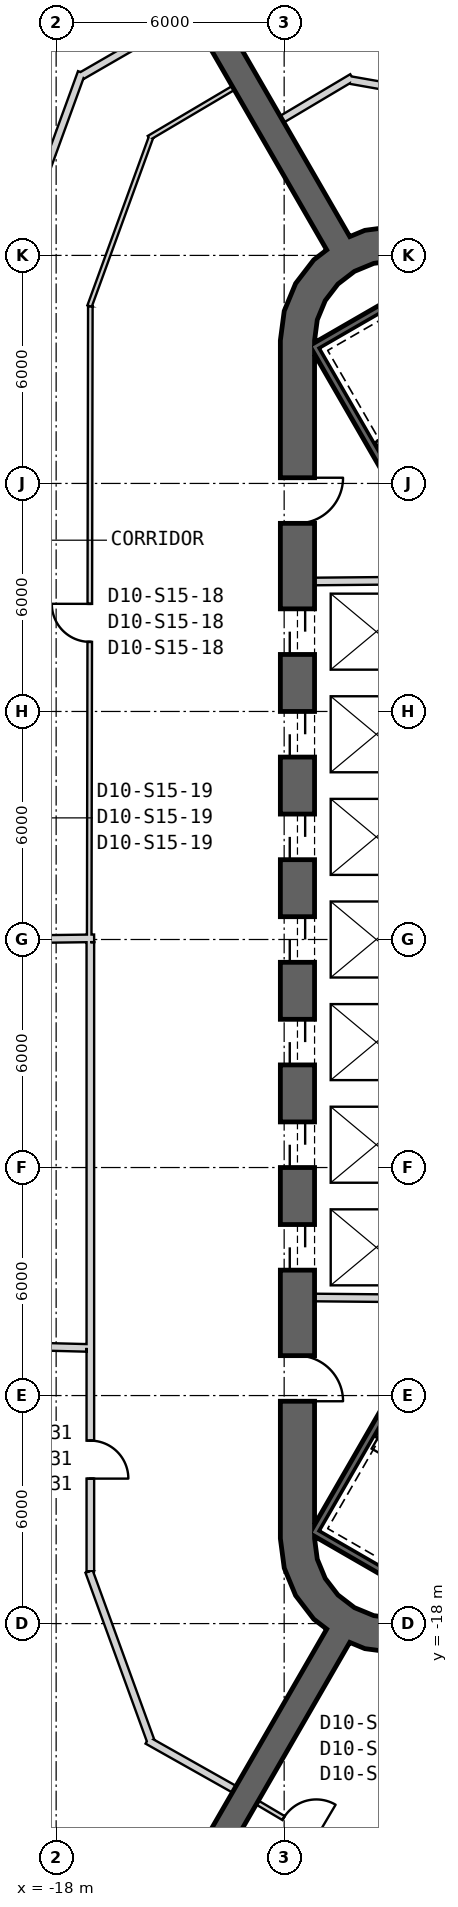
"""IFC4 building model, lengths in metres.
Left out: names, types, materials, properties, quantities, classifications, styles, units other than length and angle.
Written with IfcOpenShell. Run it as: python <this file> out.ifc"""

import sys

from ifc_helpers import new_model, si_unit, direction, frame, frame_2d, origin, place, context, subcontext, project, spatial, polyline, rectangle, outline, extrude, element, fill, save


model = new_model("IFC4")
c1 = context("Model", 3, precision=1e-05, world=origin(), true_north=direction((0.0, 1.0)))
c2 = subcontext(c1, "Body", "Model", "MODEL_VIEW")
j1 = project(units=[si_unit("LENGTHUNIT", "METRE"), si_unit("PLANEANGLEUNIT", "RADIAN")], contexts=[c1])
p1 = place(None, origin())
s1 = spatial("IfcSite", under=j1, at=p1, CompositionType="ELEMENT")
p2 = place(p1, origin())
s2 = spatial("IfcBuilding", under=s1, at=p2, CompositionType="ELEMENT")
p3 = place(p2, frame((0.0, 0.0, 241.2)))
s3 = spatial("IfcBuildingStorey", under=s2, at=p3, CompositionType="ELEMENT", Elevation=241.2)
p4 = place(p3, frame((-11.65, 15.762, 0.0), z_axis=(0.0, 0.0, 1.0), x_axis=(0.0, -1.0, 0.0)))
e1 = element("IfcWall", 1, at=p4, inside=s3, PredefinedType="SHEAR", context=c2, shape_type="SweptSolid", body=[
    extrude(rectangle(XDim=31.523, YDim=0.9, at=frame_2d((15.762, 0.0))), origin(), (0.0, 0.0, 1.0), 4.0),
])
p5 = place(p4, frame((7.062, 0.0, 0.0)))
e2 = element("IfcOpeningElement", 2, at=p5, cuts=e1, PredefinedType="OPENING", context=c2, shape_type="SweptSolid", body=[
    extrude(rectangle(XDim=1.2, YDim=2.4, at=frame_2d((0.6, 1.2))), frame((0.0, 0.46, 0.0), z_axis=(0.0, -1.0, 0.0), x_axis=(1.0, 0.0, 0.0)), (0.0, 0.0, 1.0), 0.92),
])
p6 = place(p4, frame((9.762, 0.0, 0.0)))
e3 = element("IfcOpeningElement", 3, at=p6, cuts=e1, PredefinedType="OPENING", context=c2, shape_type="SweptSolid", body=[
    extrude(rectangle(XDim=1.2, YDim=2.4, at=frame_2d((0.6, 1.2))), frame((0.0, 0.46, 0.0), z_axis=(0.0, -1.0, 0.0), x_axis=(1.0, 0.0, 0.0)), (0.0, 0.0, 1.0), 0.92),
])
p7 = place(p4, frame((12.462, 0.0, 0.0)))
e4 = element("IfcOpeningElement", 4, at=p7, cuts=e1, PredefinedType="OPENING", context=c2, shape_type="SweptSolid", body=[
    extrude(rectangle(XDim=1.2, YDim=2.4, at=frame_2d((0.6, 1.2))), frame((0.0, 0.46, 0.0), z_axis=(0.0, -1.0, 0.0), x_axis=(1.0, 0.0, 0.0)), (0.0, 0.0, 1.0), 0.92),
])
p8 = place(p4, frame((15.162, 0.0, 0.0)))
e5 = element("IfcOpeningElement", 5, at=p8, cuts=e1, PredefinedType="OPENING", context=c2, shape_type="SweptSolid", body=[
    extrude(rectangle(XDim=1.2, YDim=2.4, at=frame_2d((0.6, 1.2))), frame((0.0, 0.46, 0.0), z_axis=(0.0, -1.0, 0.0), x_axis=(1.0, 0.0, 0.0)), (0.0, 0.0, 1.0), 0.92),
])
p9 = place(p4, frame((17.862, 0.0, 0.0)))
e6 = element("IfcOpeningElement", 6, at=p9, cuts=e1, PredefinedType="OPENING", context=c2, shape_type="SweptSolid", body=[
    extrude(rectangle(XDim=1.2, YDim=2.4, at=frame_2d((0.6, 1.2))), frame((0.0, 0.46, 0.0), z_axis=(0.0, -1.0, 0.0), x_axis=(1.0, 0.0, 0.0)), (0.0, 0.0, 1.0), 0.92),
])
p10 = place(p4, frame((20.562, 0.0, 0.0)))
e7 = element("IfcOpeningElement", 7, at=p10, cuts=e1, PredefinedType="OPENING", context=c2, shape_type="SweptSolid", body=[
    extrude(rectangle(XDim=1.2, YDim=2.4, at=frame_2d((0.6, 1.2))), frame((0.0, 0.46, 0.0), z_axis=(0.0, -1.0, 0.0), x_axis=(1.0, 0.0, 0.0)), (0.0, 0.0, 1.0), 0.92),
])
p11 = place(p4, frame((23.262, 0.0, 0.0)))
e8 = element("IfcOpeningElement", 8, at=p11, cuts=e1, PredefinedType="OPENING", context=c2, shape_type="SweptSolid", body=[
    extrude(rectangle(XDim=1.2, YDim=2.4, at=frame_2d((0.6, 1.2))), frame((0.0, 0.46, 0.0), z_axis=(0.0, -1.0, 0.0), x_axis=(1.0, 0.0, 0.0)), (0.0, 0.0, 1.0), 0.92),
])
p12 = place(p4, frame((3.612, 0.0, 0.0)))
e9 = element("IfcOpeningElement", 9, at=p12, cuts=e1, PredefinedType="OPENING", context=c2, shape_type="SweptSolid", body=[
    extrude(rectangle(XDim=1.2, YDim=2.4, at=frame_2d((0.6, 1.2))), frame((0.0, 0.46, 0.0), z_axis=(0.0, -1.0, 0.0), x_axis=(1.0, 0.0, 0.0)), (0.0, 0.0, 1.0), 0.92),
])
p13 = place(p4, frame((26.712, 0.0, 0.0)))
e10 = element("IfcOpeningElement", 10, at=p13, cuts=e1, PredefinedType="OPENING", context=c2, shape_type="SweptSolid", body=[
    extrude(rectangle(XDim=1.2, YDim=2.4, at=frame_2d((0.6, 1.2))), frame((0.0, 0.46, 0.0), z_axis=(0.0, -1.0, 0.0), x_axis=(1.0, 0.0, 0.0)), (0.0, 0.0, 1.0), 0.92),
])
p14 = place(p3, origin())
e11 = element("IfcWall", 11, at=p14, inside=s3, PredefinedType="SHEAR", context=c2, shape_type="SweptSolid", body=[
    extrude(outline(polyline([(-7.6, 18.36), (-8.323, 18.659), (-9.1, 18.762), (-9.876, 18.659), (-10.6, 18.36), (-11.221, 17.883), (-11.698, 17.262), (-11.998, 16.538), (-12.1, 15.762), (-11.2, 15.762), (-11.128, 16.305), (-10.919, 16.812), (-10.585, 17.247), (-10.15, 17.58), (-9.644, 17.79), (-9.1, 17.862), (-8.556, 17.79), (-8.05, 17.58), (-7.6, 18.36)])), origin(), (0.0, 0.0, 1.0), 4.0),
])
p15 = place(p3, origin())
e12 = element("IfcWall", 12, at=p15, inside=s3, PredefinedType="SHEAR", context=c2, shape_type="SweptSolid", body=[
    extrude(outline(polyline([(-12.1, -15.762), (-11.998, -16.538), (-11.698, -17.262), (-11.221, -17.883), (-10.6, -18.36), (-9.876, -18.659), (-9.1, -18.762), (-8.323, -18.659), (-7.6, -18.36), (-8.05, -17.58), (-8.556, -17.79), (-9.1, -17.862), (-9.644, -17.79), (-10.15, -17.58), (-10.585, -17.247), (-10.919, -16.812), (-11.128, -16.305), (-11.2, -15.762), (-12.1, -15.762)])), origin(), (0.0, 0.0, 1.0), 4.0),
])
for number, where, z_axis, x_axis in (
    (13, (-10.575, 18.316, 0.0), (0.0, 0.0, 1.0), (-0.5, 0.866, 0.0)),
    (14, (-10.575, -18.316, 0.0), (0.0, 0.0, 1.0), (-0.5, -0.866, 0.0)),
):
    element("IfcWall", number, at=place(p3, frame(where, z_axis=z_axis, x_axis=x_axis)), inside=s3, PredefinedType="SHEAR", context=c2, shape_type="SweptSolid", body=[
        extrude(rectangle(XDim=10.9, YDim=0.7, at=frame_2d((5.45, 0.0))), origin(), (0.0, 0.0, 1.0), 4.0),
    ])
p16 = place(p3, frame((-11.2, 9.42, 0.0), z_axis=(0.0, 0.0, 1.0), x_axis=(0.999957167047, 0.009255488683, 0.0)))
e15 = element("IfcWall", 15, at=p16, inside=s3, PredefinedType="PLUMBINGWALL", context=c2, shape_type="SweptSolid", body=[
    extrude(rectangle(XDim=3.35, YDim=0.2, at=frame_2d((1.675, 0.0))), origin(), (0.0, 0.0, 1.0), 3.7),
])
p17 = place(p3, frame((-8.05, -9.449, 0.0), z_axis=(0.0, 0.0, 1.0), x_axis=(-0.999957467379, 0.009222983926, 0.0)))
e16 = element("IfcWall", 16, at=p17, inside=s3, PredefinedType="PLUMBINGWALL", context=c2, shape_type="SweptSolid", body=[
    extrude(rectangle(XDim=3.15, YDim=0.2, at=frame_2d((1.575, 0.0))), origin(), (0.0, 0.0, 1.0), 3.7),
])
p18 = place(p3, frame((-11.245, 15.678, -0.3), z_axis=(0.0, 0.0, 1.0), x_axis=(0.499977274689, -0.866038523851, 0.0)))
e17 = element("IfcWall", 17, at=p18, inside=s3, PredefinedType="SHEAR", context=c2, shape_type="SweptSolid", body=[
    extrude(rectangle(XDim=8.1, YDim=0.2, at=frame_2d((4.05, 0.0))), origin(), (0.0, 0.0, 1.0), 4.0),
])
for number, where, z_axis, x_axis in (
    (18, (-7.818, 17.541, -0.3), (0.0, 0.0, 1.0), (-0.866, -0.5, 0.0)),
    (19, (-11.282, -15.541, -0.3), (0.0, 0.0, 1.0), (0.866, -0.5, 0.0)),
):
    element("IfcWall", number, at=place(p3, frame(where, z_axis=z_axis, x_axis=x_axis)), inside=s3, PredefinedType="SHEAR", context=c2, shape_type="SweptSolid", body=[
        extrude(rectangle(XDim=3.8, YDim=0.2, at=frame_2d((1.9, 0.0))), origin(), (0.0, 0.0, 1.0), 4.0),
    ])
p19 = place(p3, frame((-7.196, -8.663, -0.3), z_axis=(0.0, 0.0, 1.0), x_axis=(-0.499997992926, -0.866026562566, 0.0)))
e20 = element("IfcWall", 20, at=p19, inside=s3, PredefinedType="SHEAR", context=c2, shape_type="SweptSolid", body=[
    extrude(rectangle(XDim=7.9, YDim=0.2, at=frame_2d((3.95, 0.0))), origin(), (0.0, 0.0, 1.0), 4.0),
])
p20 = place(p3, frame((-13.339, 22.405, 0.0), z_axis=(0.0, 0.0, 1.0), x_axis=(-0.86070028932, -0.509111983718, 0.0)))
e21 = element("IfcWall", 21, at=p20, inside=s3, PredefinedType="PARTITIONING", context=c2, shape_type="SweptSolid", body=[
    extrude(rectangle(XDim=2.579, YDim=0.12, at=frame_2d((1.29, 0.0))), origin(), (0.0, 0.0, 1.0), 3.7),
])
p21 = place(p3, frame((-15.506, 21.103, 0.0), z_axis=(0.0, 0.0, 1.0), x_axis=(-0.342017079535, -0.939693735909, 0.0)))
e22 = element("IfcWall", 22, at=p21, inside=s3, PredefinedType="PARTITIONING", context=c2, shape_type="SweptSolid", body=[
    extrude(rectangle(XDim=4.721, YDim=0.12, at=frame_2d((2.361, 0.0))), origin(), (0.0, 0.0, 1.0), 2.88),
])
p22 = place(p3, frame((-17.13, 0.0, 0.0), z_axis=(0.0, 0.0, 1.0), x_axis=(0.001787542932, 0.999998402344, 0.0)))
e23 = element("IfcWall", 23, at=p22, inside=s3, PredefinedType="PARTITIONING", context=c2, shape_type="SweptSolid", body=[
    extrude(rectangle(XDim=16.663, YDim=0.12, at=frame_2d((8.331, 0.0))), origin(), (0.0, 0.0, 1.0), 2.98),
])
p23 = place(p22, frame((7.831, 0.0, 0.0)))
e24 = element("IfcOpeningElement", 24, at=p23, cuts=e23, PredefinedType="OPENING", context=c2, shape_type="SweptSolid", body=[
    extrude(rectangle(XDim=1.0, YDim=2.1, at=frame_2d((0.5, 1.05))), frame((0.0, 0.07, 0.0), z_axis=(0.0, -1.0, 0.0), x_axis=(1.0, 0.0, 0.0)), (0.0, 0.0, 1.0), 0.14),
])
p24 = place(p3, frame((-19.5, -0.001, 0.0), z_axis=(0.0, 0.0, 1.0), x_axis=(0.999915662945, 0.012987185857, 0.0)))
e25 = element("IfcWall", 25, at=p24, inside=s3, PredefinedType="PARTITIONING", context=c2, shape_type="SweptSolid", body=[
    extrude(rectangle(XDim=2.5, YDim=0.2, at=frame_2d((1.25, 0.0))), origin(), (0.0, 0.0, 1.0), 3.07),
])
p25 = place(p3, frame((-17.331, 22.814, 0.0), z_axis=(0.0, 0.0, 1.0), x_axis=(-0.342006584993, -0.939697555505, 0.0)))
e26 = element("IfcWall", 26, at=p25, inside=s3, PredefinedType="PARTITIONING", context=c2, shape_type="SweptSolid", body=[
    extrude(rectangle(XDim=5.951, YDim=0.2, at=frame_2d((2.975, 0.0))), origin(), (0.0, 0.0, 1.0), 2.88),
])
p26 = place(p3, frame((-14.98, 24.083, 0.0), z_axis=(0.0, 0.0, 1.0), x_axis=(-0.866008795918, -0.500028764566, 0.0)))
e27 = element("IfcWall", 27, at=p26, inside=s3, PredefinedType="PARTITIONING", context=c2, shape_type="SweptSolid", body=[
    extrude(rectangle(XDim=2.714, YDim=0.2, at=frame_2d((1.357, 0.0))), origin(), (0.0, 0.0, 1.0), 3.7),
])
p27 = place(p3, frame((-15.598, -21.072, 0.0), z_axis=(0.0, 0.0, 1.0), x_axis=(0.871234731294, -0.490866624438, 0.0)))
e28 = element("IfcWall", 28, at=p27, inside=s3, PredefinedType="PARTITIONING", context=c2, shape_type="SweptSolid", body=[
    extrude(rectangle(XDim=2.623, YDim=0.2, at=frame_2d((1.311, 0.0))), origin(), (0.0, 0.0, 1.0), 3.7),
])
p28 = place(p3, frame((-17.134, -16.629, 0.0), z_axis=(0.0, 0.0, 1.0), x_axis=(0.342036655594, -0.939686610647, 0.0)))
e29 = element("IfcWall", 29, at=p28, inside=s3, PredefinedType="PARTITIONING", context=c2, shape_type="SweptSolid", body=[
    extrude(rectangle(XDim=4.74, YDim=0.2, at=frame_2d((2.37, 0.0))), origin(), (0.0, 0.0, 1.0), 2.88),
])
p29 = place(p3, frame((-17.1, -0.07, 0.0), z_axis=(0.0, 0.0, 1.0), x_axis=(0.0, -1.0, 0.0)))
e30 = element("IfcWall", 30, at=p29, inside=s3, PredefinedType="PARTITIONING", context=c2, shape_type="SweptSolid", body=[
    extrude(rectangle(XDim=16.552, YDim=0.2, at=frame_2d((8.276, 0.0))), origin(), (0.0, 0.0, 1.0), 2.98),
])
p30 = place(p29, frame((13.115, 0.0, 0.0)))
e31 = element("IfcOpeningElement", 31, at=p30, cuts=e30, PredefinedType="OPENING", context=c2, shape_type="SweptSolid", body=[
    extrude(rectangle(XDim=1.0, YDim=2.1, at=frame_2d((0.5, 1.05))), frame((0.0, 0.11, 0.0), z_axis=(0.0, -1.0, 0.0), x_axis=(1.0, 0.0, 0.0)), (0.0, 0.0, 1.0), 0.22),
])
p31 = place(p3, frame((-10.21, 22.681, 0.0), z_axis=(0.0, 0.0, 1.0), x_axis=(-0.859700405816, -0.510798602425, 0.0)))
e32 = element("IfcWall", 32, at=p31, inside=s3, PredefinedType="PARTITIONING", context=c2, shape_type="SweptSolid", body=[
    extrude(rectangle(XDim=2.149, YDim=0.2, at=frame_2d((1.074, 0.0))), origin(), (0.0, 0.0, 1.0), 3.7),
])
p32 = place(p3, frame((-6.285, 21.913, 0.0), z_axis=(0.0, 0.0, 1.0), x_axis=(-0.984806073034, 0.173657705026, 0.0)))
e33 = element("IfcWall", 33, at=p32, inside=s3, PredefinedType="PARTITIONING", context=c2, shape_type="SweptSolid", body=[
    extrude(rectangle(XDim=4.038, YDim=0.2, at=frame_2d((2.019, 0.0))), origin(), (0.0, 0.0, 1.0), 2.88),
])
p33 = place(p3, frame((-10.55, -23.985, 0.0), z_axis=(0.0, 0.0, 1.0), x_axis=(0.984807711093, 0.1736484154, 0.0)))
e34 = element("IfcWall", 34, at=p33, inside=s3, PredefinedType="PARTITIONING", context=c2, shape_type="SweptSolid", body=[
    extrude(rectangle(XDim=3.764, YDim=0.12, at=frame_2d((1.882, 0.0))), origin(), (0.0, 0.0, 1.0), 2.88),
])
p34 = place(p33, frame((1.54, 0.0, 0.0)))
e35 = element("IfcOpeningElement", 35, at=p34, cuts=e34, PredefinedType="OPENING", context=c2, shape_type="SweptSolid", body=[
    extrude(rectangle(XDim=0.9, YDim=2.1, at=frame_2d((0.45, 1.05))), frame((0.0, 0.07, 0.0), z_axis=(0.0, -1.0, 0.0), x_axis=(1.0, 0.0, 0.0)), (0.0, 0.0, 1.0), 0.14),
])
p35 = place(p3, frame((-12.707, -22.709, 0.0), z_axis=(0.0, 0.0, 1.0), x_axis=(0.860742216303, -0.509041095663, 0.0)))
e36 = element("IfcWall", 36, at=p35, inside=s3, PredefinedType="PARTITIONING", context=c2, shape_type="SweptSolid", body=[
    extrude(rectangle(XDim=2.506, YDim=0.12, at=frame_2d((1.253, 0.0))), origin(), (0.0, 0.0, 1.0), 3.7),
])
p36 = place(p35, frame((0.803, 0.0, 0.0)))
e37 = element("IfcOpeningElement", 37, at=p36, cuts=e36, PredefinedType="OPENING", context=c2, shape_type="SweptSolid", body=[
    extrude(rectangle(XDim=1.0, YDim=2.1, at=frame_2d((0.5, 1.05))), frame((0.0, 0.07, 0.0), z_axis=(0.0, -1.0, 0.0), x_axis=(1.0, 0.0, 0.0)), (0.0, 0.0, 1.0), 0.14),
])
p37 = place(p3, frame((-17.2, -10.746, 0.0), z_axis=(0.0, 0.0, 1.0), x_axis=(-0.9996635128, 0.025939567783, 0.0)))
e38 = element("IfcWall", 38, at=p37, inside=s3, PredefinedType="PARTITIONING", context=c2, shape_type="SweptSolid", body=[
    extrude(rectangle(XDim=9.986, YDim=0.2, at=frame_2d((4.993, 0.0))), origin(), (0.0, 0.0, 1.0), 2.98),
])
p38 = place(p23, origin())
e39 = element("IfcDoor", 39, at=p38, inside=s3, OperationType="SINGLE_SWING_RIGHT", PredefinedType="NOTDEFINED", context=c2, shape_type="SweptSolid", body=[
    extrude(rectangle(XDim=1.0, YDim=2.1, at=frame_2d((0.5, 1.05))), frame((0.0, 0.025, 0.0), z_axis=(0.0, -1.0, 0.0), x_axis=(1.0, 0.0, 0.0)), (0.0, 0.0, 1.0), 0.05),
])
fill(e24, e39)
p39 = place(p36, origin())
e40 = element("IfcDoor", 40, at=p39, inside=s3, OperationType="SINGLE_SWING_LEFT", PredefinedType="NOTDEFINED", context=c2, shape_type="SweptSolid", body=[
    extrude(rectangle(XDim=1.0, YDim=2.1, at=frame_2d((0.5, 1.05))), frame((0.0, 0.025, 0.0), z_axis=(0.0, -1.0, 0.0), x_axis=(1.0, 0.0, 0.0)), (0.0, 0.0, 1.0), 0.05),
])
fill(e37, e40)
p40 = place(p30, origin())
e41 = element("IfcDoor", 41, at=p40, inside=s3, OperationType="SINGLE_SWING_RIGHT", PredefinedType="USERDEFINED", context=c2, shape_type="SweptSolid", body=[
    extrude(rectangle(XDim=1.0, YDim=2.1, at=frame_2d((0.5, 1.05))), frame((0.0, 0.025, 0.0), z_axis=(0.0, -1.0, 0.0), x_axis=(1.0, 0.0, 0.0)), (0.0, 0.0, 1.0), 0.05),
])
fill(e31, e41)
p41 = place(p5, origin())
e42 = element("IfcDoor", 42, at=p41, inside=s3, OperationType="SLIDING_TO_LEFT", PredefinedType="USERDEFINED", context=c2, shape_type="SweptSolid", body=[
    extrude(rectangle(XDim=1.2, YDim=2.4, at=frame_2d((0.6, 1.2))), frame((0.0, 0.025, 0.0), z_axis=(0.0, -1.0, 0.0), x_axis=(1.0, 0.0, 0.0)), (0.0, 0.0, 1.0), 0.05),
])
fill(e2, e42)
p42 = place(p6, origin())
e43 = element("IfcDoor", 43, at=p42, inside=s3, OperationType="SLIDING_TO_LEFT", PredefinedType="USERDEFINED", context=c2, shape_type="SweptSolid", body=[
    extrude(rectangle(XDim=1.2, YDim=2.4, at=frame_2d((0.6, 1.2))), frame((0.0, 0.025, 0.0), z_axis=(0.0, -1.0, 0.0), x_axis=(1.0, 0.0, 0.0)), (0.0, 0.0, 1.0), 0.05),
])
fill(e3, e43)
p43 = place(p7, origin())
e44 = element("IfcDoor", 44, at=p43, inside=s3, OperationType="SLIDING_TO_LEFT", PredefinedType="USERDEFINED", context=c2, shape_type="SweptSolid", body=[
    extrude(rectangle(XDim=1.2, YDim=2.4, at=frame_2d((0.6, 1.2))), frame((0.0, 0.025, 0.0), z_axis=(0.0, -1.0, 0.0), x_axis=(1.0, 0.0, 0.0)), (0.0, 0.0, 1.0), 0.05),
])
fill(e4, e44)
p44 = place(p8, origin())
e45 = element("IfcDoor", 45, at=p44, inside=s3, OperationType="SLIDING_TO_LEFT", PredefinedType="USERDEFINED", context=c2, shape_type="SweptSolid", body=[
    extrude(rectangle(XDim=1.2, YDim=2.4, at=frame_2d((0.6, 1.2))), frame((0.0, 0.025, 0.0), z_axis=(0.0, -1.0, 0.0), x_axis=(1.0, 0.0, 0.0)), (0.0, 0.0, 1.0), 0.05),
])
fill(e5, e45)
p45 = place(p9, origin())
e46 = element("IfcDoor", 46, at=p45, inside=s3, OperationType="SLIDING_TO_LEFT", PredefinedType="USERDEFINED", context=c2, shape_type="SweptSolid", body=[
    extrude(rectangle(XDim=1.2, YDim=2.4, at=frame_2d((0.6, 1.2))), frame((0.0, 0.025, 0.0), z_axis=(0.0, -1.0, 0.0), x_axis=(1.0, 0.0, 0.0)), (0.0, 0.0, 1.0), 0.05),
])
fill(e6, e46)
p46 = place(p10, origin())
e47 = element("IfcDoor", 47, at=p46, inside=s3, OperationType="SLIDING_TO_LEFT", PredefinedType="USERDEFINED", context=c2, shape_type="SweptSolid", body=[
    extrude(rectangle(XDim=1.2, YDim=2.4, at=frame_2d((0.6, 1.2))), frame((0.0, 0.025, 0.0), z_axis=(0.0, -1.0, 0.0), x_axis=(1.0, 0.0, 0.0)), (0.0, 0.0, 1.0), 0.05),
])
fill(e7, e47)
p47 = place(p11, origin())
e48 = element("IfcDoor", 48, at=p47, inside=s3, OperationType="SLIDING_TO_LEFT", PredefinedType="USERDEFINED", context=c2, shape_type="SweptSolid", body=[
    extrude(rectangle(XDim=1.2, YDim=2.4, at=frame_2d((0.6, 1.2))), frame((0.0, 0.025, 0.0), z_axis=(0.0, -1.0, 0.0), x_axis=(1.0, 0.0, 0.0)), (0.0, 0.0, 1.0), 0.05),
])
fill(e8, e48)
p48 = place(p12, origin())
e49 = element("IfcDoor", 49, at=p48, inside=s3, OperationType="SINGLE_SWING_RIGHT", PredefinedType="USERDEFINED", context=c2, shape_type="SweptSolid", body=[
    extrude(rectangle(XDim=1.2, YDim=2.4, at=frame_2d((0.6, 1.2))), frame((0.0, 0.025, 0.0), z_axis=(0.0, -1.0, 0.0), x_axis=(1.0, 0.0, 0.0)), (0.0, 0.0, 1.0), 0.05),
])
fill(e9, e49)
p49 = place(p13, origin())
e50 = element("IfcDoor", 50, at=p49, inside=s3, OperationType="SINGLE_SWING_RIGHT", PredefinedType="USERDEFINED", context=c2, shape_type="SweptSolid", body=[
    extrude(rectangle(XDim=1.2, YDim=2.4, at=frame_2d((0.6, 1.2))), frame((0.0, 0.025, 0.0), z_axis=(0.0, -1.0, 0.0), x_axis=(1.0, 0.0, 0.0)), (0.0, 0.0, 1.0), 0.05),
])
fill(e10, e50)
save(model, sys.argv[1])
